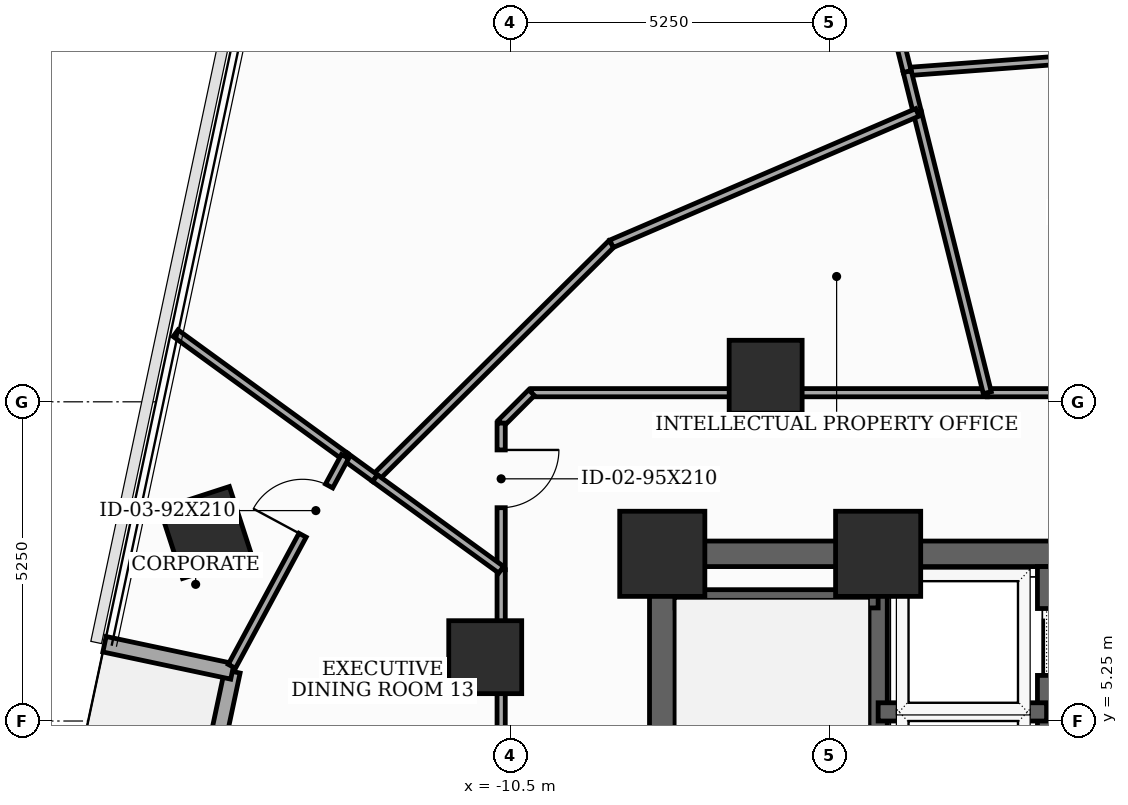
"""IFC4 building model, lengths in metres.
Left out: names, types, materials, properties, quantities, classifications, styles, units other than length and angle.
Written with IfcOpenShell. Run it as: python <this file> out.ifc"""

import sys

from ifc_helpers import new_model, si_unit, direction, frame, frame_2d, origin, origin_2d, place, context, subcontext, project, spatial, rectangle, extrude, element, fill, save


model = new_model("IFC4")
c1 = context("Model", 3, precision=1e-05, world=origin(), true_north=direction((0.0, 1.0)))
c2 = subcontext(c1, "Body", "Model", "MODEL_VIEW")
j1 = project(units=[si_unit("LENGTHUNIT", "METRE"), si_unit("PLANEANGLEUNIT", "RADIAN")], contexts=[c1])
p1 = place(None, origin())
s1 = spatial("IfcSite", under=j1, at=p1, CompositionType="ELEMENT")
p2 = place(p1, origin())
s2 = spatial("IfcBuilding", under=s1, at=p2, CompositionType="ELEMENT")
p3 = place(p2, frame((0.0, 0.0, 112.5)))
s3 = spatial("IfcBuildingStorey", under=s2, at=p3, CompositionType="ELEMENT", Elevation=112.5)
for number, where, z_axis, x_axis in (
    (1, (-4.45, 8.0, 0.0), (0.0, 0.0, 1.0), (1.0, 0.0, 0.0)),
    (2, (-8.0, 8.0, 0.0), (0.0, 0.0, 1.0), (1.0, 0.0, 0.0)),
):
    element("IfcColumn", number, at=place(p3, frame(where, z_axis=z_axis, x_axis=x_axis)), inside=s3, PredefinedType="COLUMN", context=c2, shape_type="SweptSolid", body=[
        extrude(rectangle(XDim=1.4, YDim=1.4, at=origin_2d()), origin(), (0.0, 0.0, 1.0), 3.7),
    ])
for number, where, z_axis, x_axis in (
    (3, (-6.3, 10.912, 0.0), (0.0, 0.0, 1.0), (1.0, 0.0, 0.0)),
    (4, (-10.912, 6.3, 0.0), (0.0, 0.0, 1.0), (1.0, 0.0, 0.0)),
    (5, (-15.505, 8.35, 0.0), (0.0, 0.0, 1.0), (0.951, 0.309, 0.0)),
):
    element("IfcColumn", number, at=place(p3, frame(where, z_axis=z_axis, x_axis=x_axis)), inside=s3, PredefinedType="COLUMN", context=c2, shape_type="SweptSolid", body=[
        extrude(rectangle(XDim=1.2, YDim=1.2, at=origin_2d()), origin(), (0.0, 0.0, 1.0), 3.7),
    ])
p4 = place(p3, frame((-15.07, 6.066, 0.0), z_axis=(0.0, 0.0, 1.0), x_axis=(-0.207900120229, -0.978150060067, 0.0)))
e6 = element("IfcWall", 6, at=p4, inside=s3, PredefinedType="SOLIDWALL", context=c2, shape_type="SweptSolid", body=[
    extrude(rectangle(XDim=10.8, YDim=0.26, at=frame_2d((5.4, 0.0))), origin(), (0.0, 0.0, 1.0), 3.5),
])
p5 = place(p4, frame((1.75, 0.0, 0.0)))
e7 = element("IfcOpeningElement", 7, at=p5, cuts=e6, PredefinedType="OPENING", context=c2, shape_type="SweptSolid", body=[
    extrude(rectangle(XDim=1.6, YDim=2.08, at=frame_2d((0.8, 1.04))), frame((0.0, 0.14, 0.0), z_axis=(0.0, -1.0, 0.0), x_axis=(1.0, 0.0, 0.0)), (0.0, 0.0, 1.0), 0.28),
])
p6 = place(p4, frame((5.65, 0.0, 0.85)))
e8 = element("IfcOpeningElement", 8, at=p6, cuts=e6, PredefinedType="OPENING", context=c2, shape_type="SweptSolid", body=[
    extrude(rectangle(XDim=1.3, YDim=1.25, at=frame_2d((0.65, 0.625))), frame((0.0, 0.14, 0.0), z_axis=(0.0, -1.0, 0.0), x_axis=(1.0, 0.0, 0.0)), (0.0, 0.0, 1.0), 0.28),
])
p7 = place(p3, frame((-17.173, 6.513, 0.0), z_axis=(0.0, 0.0, 1.0), x_axis=(0.978146728319, -0.207915795165, 0.0)))
e9 = element("IfcWall", 9, at=p7, inside=s3, PredefinedType="SOLIDWALL", context=c2, shape_type="SweptSolid", body=[
    extrude(rectangle(XDim=2.15, YDim=0.26, at=frame_2d((1.075, 0.0))), origin(), (0.0, 0.0, 1.0), 3.5),
])
p8 = place(p3, frame((-8.0, -8.0, 0.0), z_axis=(0.0, 0.0, 1.0), x_axis=(0.0, 1.0, 0.0)))
e10 = element("IfcWall", 10, at=p8, inside=s3, PredefinedType="SHEAR", context=c2, shape_type="SweptSolid", body=[
    extrude(rectangle(XDim=16.0, YDim=0.42, at=frame_2d((8.0, 0.0))), origin(), (0.0, 0.0, 1.0), 3.5),
])
p9 = place(p8, frame((0.922, 0.0, 0.0)))
e11 = element("IfcOpeningElement", 11, at=p9, cuts=e10, PredefinedType="OPENING", context=c2, shape_type="SweptSolid", body=[
    extrude(rectangle(XDim=0.85, YDim=2.02, at=frame_2d((0.425, 1.01))), frame((0.0, 0.22, 0.0), z_axis=(0.0, -1.0, 0.0), x_axis=(1.0, 0.0, 0.0)), (0.0, 0.0, 1.0), 0.44),
])
p10 = place(p8, frame((5.35, 0.0, 0.0)))
e12 = element("IfcOpeningElement", 12, at=p10, cuts=e10, PredefinedType="OPENING", context=c2, shape_type="SweptSolid", body=[
    extrude(rectangle(XDim=1.05, YDim=2.15, at=frame_2d((0.525, 1.075))), frame((0.0, 0.22, 0.0), z_axis=(0.0, -1.0, 0.0), x_axis=(1.0, 0.0, 0.0)), (0.0, 0.0, 1.0), 0.44),
])
p11 = place(p3, frame((-8.0, 8.0, 0.0), z_axis=(0.0, 0.0, 1.0), x_axis=(1.0, 0.0, 0.0)))
e13 = element("IfcWall", 13, at=p11, inside=s3, PredefinedType="SHEAR", context=c2, shape_type="SweptSolid", body=[
    extrude(rectangle(XDim=16.0, YDim=0.42, at=frame_2d((8.0, 0.0))), origin(), (0.0, 0.0, 1.0), 3.5),
])
p12 = place(p11, frame((7.1, 0.0, 0.0)))
e14 = element("IfcOpeningElement", 14, at=p12, cuts=e13, PredefinedType="OPENING", context=c2, shape_type="SweptSolid", body=[
    extrude(rectangle(XDim=1.8, YDim=2.15, at=frame_2d((0.9, 1.075))), frame((0.0, 0.22, 0.0), z_axis=(0.0, -1.0, 0.0), x_axis=(1.0, 0.0, 0.0)), (0.0, 0.0, 1.0), 0.44),
])
p13 = place(p3, frame((-4.45, -7.79, 0.0), z_axis=(0.0, 0.0, 1.0), x_axis=(0.0, 1.0, 0.0)))
e15 = element("IfcWall", 15, at=p13, inside=s3, PredefinedType="SHEAR", context=c2, shape_type="SweptSolid", body=[
    extrude(rectangle(XDim=15.58, YDim=0.3, at=frame_2d((7.79, 0.0))), origin(), (0.0, 0.0, 1.0), 3.5),
])
p14 = place(p3, frame((-7.79, 7.26, 0.0), z_axis=(0.0, 0.0, 1.0), x_axis=(1.0, 0.0, 0.0)))
e16 = element("IfcWall", 16, at=p14, inside=s3, PredefinedType="SHEAR", context=c2, shape_type="SweptSolid", body=[
    extrude(rectangle(XDim=3.34, YDim=0.3, at=frame_2d((1.67, 0.0))), origin(), (0.0, 0.0, 1.0), 3.5),
])
p15 = place(p3, frame((-1.68, -4.85, 0.0), z_axis=(0.0, 0.0, 1.0), x_axis=(0.0, 1.0, 0.0)))
e17 = element("IfcWall", 17, at=p15, inside=s3, PredefinedType="SHEAR", context=c2, shape_type="SweptSolid", body=[
    extrude(rectangle(XDim=12.64, YDim=0.3, at=frame_2d((6.32, 0.0))), origin(), (0.0, 0.0, 1.0), 3.5),
])
p16 = place(p15, frame((3.95, 0.0, 0.0)))
e18 = element("IfcOpeningElement", 18, at=p16, cuts=e17, PredefinedType="OPENING", context=c2, shape_type="SweptSolid", body=[
    extrude(rectangle(XDim=1.1, YDim=2.1, at=frame_2d((0.55, 1.05))), frame((0.0, 0.16, 0.0), z_axis=(0.0, -1.0, 0.0), x_axis=(1.0, 0.0, 0.0)), (0.0, 0.0, 1.0), 0.32),
])
p17 = place(p15, frame((6.25, 0.0, 0.0)))
e19 = element("IfcOpeningElement", 19, at=p17, cuts=e17, PredefinedType="OPENING", context=c2, shape_type="SweptSolid", body=[
    extrude(rectangle(XDim=1.1, YDim=2.1, at=frame_2d((0.55, 1.05))), frame((0.0, 0.16, 0.0), z_axis=(0.0, -1.0, 0.0), x_axis=(1.0, 0.0, 0.0)), (0.0, 0.0, 1.0), 0.32),
])
p18 = place(p15, frame((8.55, 0.0, 0.0)))
e20 = element("IfcOpeningElement", 20, at=p18, cuts=e17, PredefinedType="OPENING", context=c2, shape_type="SweptSolid", body=[
    extrude(rectangle(XDim=1.1, YDim=2.1, at=frame_2d((0.55, 1.05))), frame((0.0, 0.16, 0.0), z_axis=(0.0, -1.0, 0.0), x_axis=(1.0, 0.0, 0.0)), (0.0, 0.0, 1.0), 0.32),
])
p19 = place(p15, frame((10.85, 0.0, 0.0)))
e21 = element("IfcOpeningElement", 21, at=p19, cuts=e17, PredefinedType="OPENING", context=c2, shape_type="SweptSolid", body=[
    extrude(rectangle(XDim=1.1, YDim=2.1, at=frame_2d((0.55, 1.05))), frame((0.0, 0.16, 0.0), z_axis=(0.0, -1.0, 0.0), x_axis=(1.0, 0.0, 0.0)), (0.0, 0.0, 1.0), 0.32),
])
p20 = place(p15, frame((0.45, 0.0, 0.0)))
e22 = element("IfcOpeningElement", 22, at=p20, cuts=e17, PredefinedType="OPENING", context=c2, shape_type="SweptSolid", body=[
    extrude(rectangle(XDim=0.85, YDim=2.02, at=frame_2d((0.425, 1.01))), frame((0.0, 0.16, 0.0), z_axis=(0.0, -1.0, 0.0), x_axis=(1.0, 0.0, 0.0)), (0.0, 0.0, 1.0), 0.32),
])
p21 = place(p15, frame((2.05, 0.0, 0.0)))
e23 = element("IfcOpeningElement", 23, at=p21, cuts=e17, PredefinedType="OPENING", context=c2, shape_type="SweptSolid", body=[
    extrude(rectangle(XDim=0.85, YDim=2.02, at=frame_2d((0.425, 1.01))), frame((0.0, 0.16, 0.0), z_axis=(0.0, -1.0, 0.0), x_axis=(1.0, 0.0, 0.0)), (0.0, 0.0, 1.0), 0.32),
])
p22 = place(p3, frame((-4.45, 5.4, 0.0), z_axis=(0.0, 0.0, 1.0), x_axis=(1.0, 0.0, 0.0)))
e24 = element("IfcWall", 24, at=p22, inside=s3, PredefinedType="SHEAR", context=c2, shape_type="SweptSolid", body=[
    extrude(rectangle(XDim=2.77, YDim=0.3, at=frame_2d((1.385, 0.0))), origin(), (0.0, 0.0, 1.0), 3.5),
])
p23 = place(p3, frame((10.15, 10.65, 0.0), z_axis=(0.0, 0.0, 1.0), x_axis=(-1.0, 0.0, 0.0)))
e25 = element("IfcWall", 25, at=p23, inside=s3, PredefinedType="PARTITIONING", context=c2, shape_type="SweptSolid", body=[
    extrude(rectangle(XDim=12.805, YDim=0.135, at=frame_2d((6.402, 0.0))), origin(), (0.0, 0.0, 1.0), 2.785),
])
p24 = place(p23, frame((5.927, 0.0, 0.0)))
e26 = element("IfcOpeningElement", 26, at=p24, cuts=e25, PredefinedType="OPENING", context=c2, shape_type="SweptSolid", body=[
    extrude(rectangle(XDim=0.95, YDim=2.1, at=frame_2d((0.475, 1.05))), frame((0.0, 0.077, 0.0), z_axis=(0.0, -1.0, 0.0), x_axis=(1.0, 0.0, 0.0)), (0.0, 0.0, 1.0), 0.155),
])
p25 = place(p3, frame((-2.655, 10.65, 0.0), z_axis=(0.0, 0.0, 1.0), x_axis=(-1.0, 0.0, 0.0)))
e27 = element("IfcWall", 27, at=p25, inside=s3, PredefinedType="PARTITIONING", context=c2, shape_type="SweptSolid", body=[
    extrude(rectangle(XDim=7.495, YDim=0.135, at=frame_2d((3.748, 0.0))), origin(), (0.0, 0.0, 1.0), 2.785),
])
p26 = place(p3, frame((-10.15, 10.65, 0.0), z_axis=(0.0, 0.0, 1.0), x_axis=(-0.707106781187, -0.707106781187, 0.0)))
e28 = element("IfcWall", 28, at=p26, inside=s3, PredefinedType="PARTITIONING", context=c2, shape_type="SweptSolid", body=[
    extrude(rectangle(XDim=0.707, YDim=0.135, at=frame_2d((0.354, 0.0))), origin(), (0.0, 0.0, 1.0), 3.5),
])
p27 = place(p3, frame((-10.65, 10.15, 0.0), z_axis=(0.0, 0.0, 1.0), x_axis=(0.0, -1.0, 0.0)))
e29 = element("IfcWall", 29, at=p27, inside=s3, PredefinedType="PARTITIONING", context=c2, shape_type="SweptSolid", body=[
    extrude(rectangle(XDim=2.412, YDim=0.135, at=frame_2d((1.206, 0.0))), origin(), (0.0, 0.0, 1.0), 3.5),
])
p28 = place(p27, frame((0.442, 0.0, 0.0)))
e30 = element("IfcOpeningElement", 30, at=p28, cuts=e29, PredefinedType="OPENING", context=c2, shape_type="SweptSolid", body=[
    extrude(rectangle(XDim=0.95, YDim=2.1, at=frame_2d((0.475, 1.05))), frame((0.0, 0.077, 0.0), z_axis=(0.0, -1.0, 0.0), x_axis=(1.0, 0.0, 0.0)), (0.0, 0.0, 1.0), 0.155),
])
p29 = place(p3, frame((-10.65, 7.738, 0.0), z_axis=(0.0, 0.0, 1.0), x_axis=(0.0, -1.0, 0.0)))
e31 = element("IfcWall", 31, at=p29, inside=s3, PredefinedType="PARTITIONING", context=c2, shape_type="SweptSolid", body=[
    extrude(rectangle(XDim=5.288, YDim=0.135, at=frame_2d((2.644, 0.0))), origin(), (0.0, 0.0, 1.0), 2.785),
])
p30 = place(p29, frame((3.755, 0.0, 0.0)))
e32 = element("IfcOpeningElement", 32, at=p30, cuts=e31, PredefinedType="OPENING", context=c2, shape_type="SweptSolid", body=[
    extrude(rectangle(XDim=0.95, YDim=2.1, at=frame_2d((0.475, 1.05))), frame((0.0, 0.077, 0.0), z_axis=(0.0, -1.0, 0.0), x_axis=(1.0, 0.0, 0.0)), (0.0, 0.0, 1.0), 0.155),
])
p31 = place(p3, frame((2.011, 16.377, 0.0), z_axis=(0.0, 0.0, 1.0), x_axis=(-0.997244499183, -0.074184963764, 0.0)))
e33 = element("IfcWall", 33, at=p31, inside=s3, PredefinedType="PARTITIONING", context=c2, shape_type="SweptSolid", body=[
    extrude(rectangle(XDim=6.0, YDim=0.135, at=frame_2d((3.0, 0.0))), origin(), (0.0, 0.0, 1.0), 2.785),
])
p32 = place(p3, frame((-3.972, 15.932, 0.0), z_axis=(0.0, 0.0, 1.0), x_axis=(0.241207800827, -0.970473491045, 0.0)))
e34 = element("IfcWall", 34, at=p32, inside=s3, PredefinedType="PARTITIONING", context=c2, shape_type="SweptSolid", body=[
    extrude(rectangle(XDim=0.692, YDim=0.135, at=frame_2d((0.346, 0.0))), origin(), (0.0, 0.0, 1.0), 3.5),
])
p33 = place(p3, frame((-3.805, 15.26, 0.0), z_axis=(0.0, 0.0, 1.0), x_axis=(0.242015711327, -0.970272330571, 0.0)))
e35 = element("IfcWall", 35, at=p33, inside=s3, PredefinedType="PARTITIONING", context=c2, shape_type="SweptSolid", body=[
    extrude(rectangle(XDim=4.751, YDim=0.135, at=frame_2d((2.376, 0.0))), origin(), (0.0, 0.0, 1.0), 2.785),
])
p34 = place(p3, frame((-7.646, 30.665, 0.0), z_axis=(0.0, 0.0, 1.0), x_axis=(0.241964325752, -0.970285146265, 0.0)))
e36 = element("IfcWall", 36, at=p34, inside=s3, PredefinedType="PARTITIONING", context=c2, shape_type="SweptSolid", body=[
    extrude(rectangle(XDim=15.184, YDim=0.135, at=frame_2d((7.592, 0.0))), origin(), (0.0, 0.0, 1.0), 2.935),
])
p35 = place(p34, frame((7.132, 0.0, 0.0)))
e37 = element("IfcOpeningElement", 37, at=p35, cuts=e36, PredefinedType="OPENING", context=c2, shape_type="SweptSolid", body=[
    extrude(rectangle(XDim=0.92, YDim=2.1, at=frame_2d((0.46, 1.05))), frame((0.0, 0.077, 0.0), z_axis=(0.0, -1.0, 0.0), x_axis=(1.0, 0.0, 0.0)), (0.0, 0.0, 1.0), 0.155),
])
p36 = place(p3, frame((-12.724, 9.244, 0.0), z_axis=(0.0, 0.0, 1.0), x_axis=(0.710198472987, 0.704001512049, 0.0)))
e38 = element("IfcWall", 38, at=p36, inside=s3, PredefinedType="PARTITIONING", context=c2, shape_type="SweptSolid", body=[
    extrude(rectangle(XDim=5.476, YDim=0.135, at=frame_2d((2.738, 0.0))), origin(), (0.0, 0.0, 1.0), 3.125),
])
p37 = place(p3, frame((-8.835, 13.099, 0.0), z_axis=(0.0, 0.0, 1.0), x_axis=(0.918803297785, 0.394715720463, 0.0)))
e39 = element("IfcWall", 39, at=p37, inside=s3, PredefinedType="PARTITIONING", context=c2, shape_type="SweptSolid", body=[
    extrude(rectangle(XDim=5.475, YDim=0.135, at=frame_2d((2.737, 0.0))), origin(), (0.0, 0.0, 1.0), 2.785),
])
p38 = place(p3, frame((-16.004, 11.628, 0.0), z_axis=(0.0, 0.0, 1.0), x_axis=(0.80894744699, -0.587880964148, 0.0)))
e40 = element("IfcWall", 40, at=p38, inside=s3, PredefinedType="PARTITIONING", context=c2, shape_type="SweptSolid", body=[
    extrude(rectangle(XDim=3.446, YDim=0.135, at=frame_2d((1.723, 0.0))), origin(), (0.0, 0.0, 1.0), 2.935),
])
p39 = place(p3, frame((-13.217, 9.602, 0.0), z_axis=(0.0, 0.0, 1.0), x_axis=(0.808995913271, -0.587814266849, 0.0)))
e41 = element("IfcWall", 41, at=p39, inside=s3, PredefinedType="PARTITIONING", context=c2, shape_type="SweptSolid", body=[
    extrude(rectangle(XDim=0.609, YDim=0.135, at=frame_2d((0.305, 0.0))), origin(), (0.0, 0.0, 1.0), 3.125),
])
p40 = place(p3, frame((-12.724, 9.244, 0.0), z_axis=(0.0, 0.0, 1.0), x_axis=(0.809230060509, -0.587491880087, 0.0)))
e42 = element("IfcWall", 42, at=p40, inside=s3, PredefinedType="PARTITIONING", context=c2, shape_type="SweptSolid", body=[
    extrude(rectangle(XDim=2.563, YDim=0.135, at=frame_2d((1.282, 0.0))), origin(), (0.0, 0.0, 1.0), 3.125),
])
p41 = place(p3, frame((-15.079, 6.149, 0.0), z_axis=(0.0, 0.0, 1.0), x_axis=(0.474585971175, 0.88020915467, 0.0)))
e43 = element("IfcWall", 43, at=p41, inside=s3, PredefinedType="PARTITIONING", context=c2, shape_type="SweptSolid", body=[
    extrude(rectangle(XDim=3.923, YDim=0.135, at=frame_2d((1.961, 0.0))), origin(), (0.0, 0.0, 1.0), 2.785),
])
p42 = place(p41, frame((2.45, 0.0, 0.0)))
e44 = element("IfcOpeningElement", 44, at=p42, cuts=e43, PredefinedType="OPENING", context=c2, shape_type="SweptSolid", body=[
    extrude(rectangle(XDim=0.92, YDim=2.1, at=frame_2d((0.46, 1.05))), frame((0.0, 0.077, 0.0), z_axis=(0.0, -1.0, 0.0), x_axis=(1.0, 0.0, 0.0)), (0.0, 0.0, 1.0), 0.155),
])
p43 = place(p19, origin())
e45 = element("IfcDoor", 45, at=p43, inside=s3, OperationType="SLIDING_TO_LEFT", PredefinedType="DOOR", context=c2, shape_type="SweptSolid", body=[
    extrude(rectangle(XDim=1.1, YDim=2.1, at=frame_2d((0.55, 1.05))), frame((0.0, 0.025, 0.0), z_axis=(0.0, -1.0, 0.0), x_axis=(1.0, 0.0, 0.0)), (0.0, 0.0, 1.0), 0.05),
])
fill(e21, e45)
p44 = place(p28, origin())
e46 = element("IfcDoor", 46, at=p44, inside=s3, OperationType="SINGLE_SWING_LEFT", PredefinedType="DOOR", context=c2, shape_type="SweptSolid", body=[
    extrude(rectangle(XDim=0.95, YDim=2.1, at=frame_2d((0.475, 1.05))), frame((0.0, 0.025, 0.0), z_axis=(0.0, -1.0, 0.0), x_axis=(1.0, 0.0, 0.0)), (0.0, 0.0, 1.0), 0.05),
])
fill(e30, e46)
p45 = place(p42, origin())
e47 = element("IfcDoor", 47, at=p45, inside=s3, OperationType="SINGLE_SWING_LEFT", PredefinedType="DOOR", context=c2, shape_type="SweptSolid", body=[
    extrude(rectangle(XDim=0.92, YDim=2.1, at=frame_2d((0.46, 1.05))), frame((0.0, 0.025, 0.0), z_axis=(0.0, -1.0, 0.0), x_axis=(1.0, 0.0, 0.0)), (0.0, 0.0, 1.0), 0.05),
])
fill(e44, e47)
save(model, sys.argv[1])
